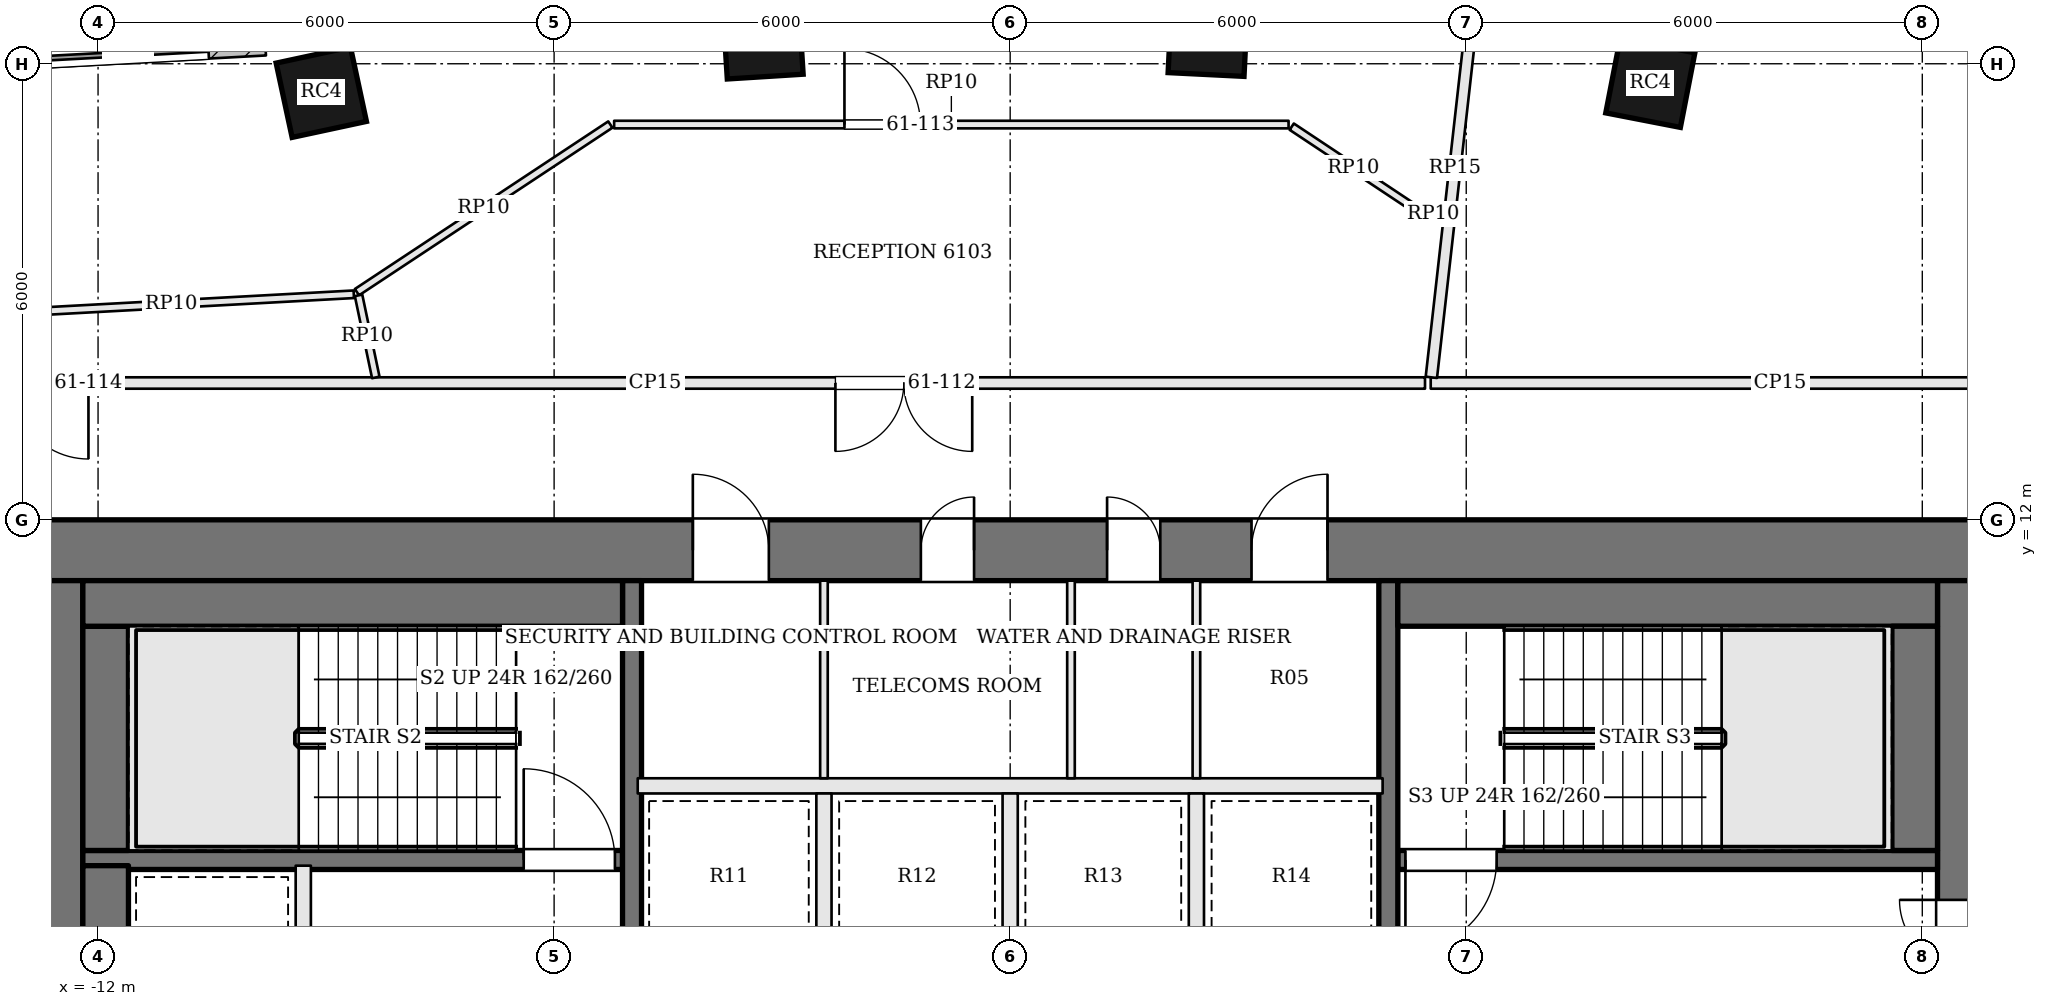
"""IFC4 building model, lengths in metres.
Left out: names, types, materials, properties, quantities, classifications, styles, units other than length and angle.
Written with IfcOpenShell. Run it as: python <this file> out.ifc"""

import sys

from ifc_helpers import new_model, si_unit, direction, frame, frame_2d, origin, origin_2d, place, context, subcontext, project, spatial, rectangle, extrude, element, fill, save


model = new_model("IFC4")
c1 = context("Model", 3, precision=1e-05, world=origin(), true_north=direction((0.0, 1.0)))
c2 = subcontext(c1, "Body", "Model", "MODEL_VIEW")
j1 = project(units=[si_unit("LENGTHUNIT", "METRE"), si_unit("PLANEANGLEUNIT", "RADIAN")], contexts=[c1])
p1 = place(None, origin())
s1 = spatial("IfcSite", under=j1, at=p1, CompositionType="ELEMENT")
p2 = place(p1, origin())
s2 = spatial("IfcBuilding", under=s1, at=p2, CompositionType="ELEMENT")
p3 = place(p2, frame((0.0, 0.0, 248.7)))
s3 = spatial("IfcBuildingStorey", under=s2, at=p3, CompositionType="ELEMENT", Elevation=248.7)
p4 = place(p3, frame((-13.0, 11.6, 0.0), z_axis=(0.0, 0.0, 1.0), x_axis=(1.0, 0.0, 0.0)))
e1 = element("IfcWall", 1, at=p4, inside=s3, PredefinedType="SHEAR", context=c2, shape_type="SweptSolid", body=[
    extrude(rectangle(XDim=26.0, YDim=0.8, at=frame_2d((13.0, 0.0))), origin(), (0.0, 0.0, 1.0), 3.9),
])
p5 = place(p4, frame((8.825, 0.0, 0.0)))
e2 = element("IfcOpeningElement", 2, at=p5, cuts=e1, PredefinedType="OPENING", context=c2, shape_type="SweptSolid", body=[
    extrude(rectangle(XDim=1.0, YDim=2.1, at=frame_2d((0.5, 1.05))), frame((0.0, 0.41, 0.0), z_axis=(0.0, -1.0, 0.0), x_axis=(1.0, 0.0, 0.0)), (0.0, 0.0, 1.0), 0.82),
])
p6 = place(p4, frame((11.825, 0.0, 0.0)))
e3 = element("IfcOpeningElement", 3, at=p6, cuts=e1, PredefinedType="OPENING", context=c2, shape_type="SweptSolid", body=[
    extrude(rectangle(XDim=0.7, YDim=2.1, at=frame_2d((0.35, 1.05))), frame((0.0, 0.41, 0.0), z_axis=(0.0, -1.0, 0.0), x_axis=(1.0, 0.0, 0.0)), (0.0, 0.0, 1.0), 0.82),
])
p7 = place(p4, frame((14.275, 0.0, 0.0)))
e4 = element("IfcOpeningElement", 4, at=p7, cuts=e1, PredefinedType="OPENING", context=c2, shape_type="SweptSolid", body=[
    extrude(rectangle(XDim=0.7, YDim=2.1, at=frame_2d((0.35, 1.05))), frame((0.0, 0.41, 0.0), z_axis=(0.0, -1.0, 0.0), x_axis=(1.0, 0.0, 0.0)), (0.0, 0.0, 1.0), 0.82),
])
p8 = place(p4, frame((16.175, 0.0, 0.0)))
e5 = element("IfcOpeningElement", 5, at=p8, cuts=e1, PredefinedType="OPENING", context=c2, shape_type="SweptSolid", body=[
    extrude(rectangle(XDim=1.0, YDim=2.1, at=frame_2d((0.5, 1.05))), frame((0.0, 0.41, 0.0), z_axis=(0.0, -1.0, 0.0), x_axis=(1.0, 0.0, 0.0)), (0.0, 0.0, 1.0), 0.82),
])
p9 = place(p3, frame((12.6, -2.2, 0.0), z_axis=(0.0, 0.0, 1.0), x_axis=(0.0, 1.0, 0.0)))
e6 = element("IfcWall", 6, at=p9, inside=s3, PredefinedType="SHEAR", context=c2, shape_type="SweptSolid", body=[
    extrude(rectangle(XDim=13.4, YDim=0.8, at=frame_2d((6.7, 0.0))), origin(), (0.0, 0.0, 1.0), 3.9),
])
p10 = place(p9, frame((7.4, 0.0, 0.0)))
e7 = element("IfcOpeningElement", 7, at=p10, cuts=e6, PredefinedType="OPENING", context=c2, shape_type="SweptSolid", body=[
    extrude(rectangle(XDim=1.8, YDim=2.1, at=frame_2d((0.9, 1.05))), frame((0.0, 0.41, 0.0), z_axis=(0.0, -1.0, 0.0), x_axis=(1.0, 0.0, 0.0)), (0.0, 0.0, 1.0), 0.82),
])
p11 = place(p3, frame((-12.6, -2.2, 0.0), z_axis=(0.0, 0.0, 1.0), x_axis=(0.0, 1.0, 0.0)))
e8 = element("IfcWall", 8, at=p11, inside=s3, PredefinedType="SHEAR", context=c2, shape_type="SweptSolid", body=[
    extrude(rectangle(XDim=13.4, YDim=0.8, at=frame_2d((6.7, 0.0))), origin(), (0.0, 0.0, 1.0), 3.9),
])
p12 = place(p11, frame((4.2, 0.0, 0.0)))
e9 = element("IfcOpeningElement", 9, at=p12, cuts=e8, PredefinedType="OPENING", context=c2, shape_type="SweptSolid", body=[
    extrude(rectangle(XDim=1.8, YDim=2.1, at=frame_2d((0.9, 1.05))), frame((0.0, 0.41, 0.0), z_axis=(0.0, -1.0, 0.0), x_axis=(1.0, 0.0, 0.0)), (0.0, 0.0, 1.0), 0.82),
])
for number, where, z_axis, x_axis in (
    (10, (8.422, 17.749, 0.0), (0.0, 0.0, 1.0), (-0.982, 0.191, 0.0)),
    (11, (2.602, 18.358, 0.0), (0.0, 0.0, 1.0), (-0.999, 0.05, 0.0)),
    (12, (-3.254, 18.33, 0.0), (0.0, 0.0, 1.0), (-0.998, -0.063, 0.0)),
    (13, (-9.063, 17.625, 0.0), (0.0, 0.0, 1.0), (-0.978, -0.21, 0.0)),
):
    element("IfcColumn", number, at=place(p3, frame(where, z_axis=z_axis, x_axis=x_axis)), inside=s3, PredefinedType="COLUMN", context=c2, shape_type="SweptSolid", body=[
        extrude(rectangle(XDim=1.0, YDim=1.0, at=origin_2d()), origin(), (0.0, 0.0, 1.0), 3.9),
    ])
p13 = place(p3, frame((-9.803, 18.334, 0.0), z_axis=(0.0, 0.0, 1.0), x_axis=(-0.998525941495, -0.054276552602, 0.0)))
e14 = element("IfcWall", 14, at=p13, inside=s3, PredefinedType="SOLIDWALL", context=c2, shape_type="SweptSolid", body=[
    extrude(rectangle(XDim=3.603, YDim=0.45, at=frame_2d((1.802, 0.0))), origin(), (0.0, 0.0, 1.0), 3.7),
])
p14 = place(p13, frame((0.751, 0.0, 0.9)))
e15 = element("IfcOpeningElement", 15, at=p14, cuts=e14, PredefinedType="OPENING", context=c2, shape_type="SweptSolid", body=[
    extrude(rectangle(XDim=2.1, YDim=2.3, at=frame_2d((1.05, 1.15))), frame((0.0, 0.235, 0.0), z_axis=(0.0, -1.0, 0.0), x_axis=(1.0, 0.0, 0.0)), (0.0, 0.0, 1.0), 0.47),
])
p15 = place(p3, frame((12.2, 7.525, 0.0), z_axis=(0.0, 0.0, 1.0), x_axis=(-1.0, 0.0, 0.0)))
e16 = element("IfcWall", 16, at=p15, inside=s3, PredefinedType="SOLIDWALL", context=c2, shape_type="SweptSolid", body=[
    extrude(rectangle(XDim=7.1, YDim=0.25, at=frame_2d((3.55, 0.0))), origin(), (0.0, 0.0, 1.0), 3.7),
])
p16 = place(p15, frame((5.8, 0.0, 0.0)))
e17 = element("IfcOpeningElement", 17, at=p16, cuts=e16, PredefinedType="OPENING", context=c2, shape_type="SweptSolid", body=[
    extrude(rectangle(XDim=1.2, YDim=2.1, at=frame_2d((0.6, 1.05))), frame((0.0, 0.135, 0.0), z_axis=(0.0, -1.0, 0.0), x_axis=(1.0, 0.0, 0.0)), (0.0, 0.0, 1.0), 0.27),
])
p17 = place(p3, frame((-12.2, 7.525, 0.0), z_axis=(0.0, 0.0, 1.0), x_axis=(1.0, 0.0, 0.0)))
e18 = element("IfcWall", 18, at=p17, inside=s3, PredefinedType="SOLIDWALL", context=c2, shape_type="SweptSolid", body=[
    extrude(rectangle(XDim=7.1, YDim=0.25, at=frame_2d((3.55, 0.0))), origin(), (0.0, 0.0, 1.0), 3.7),
])
p18 = place(p17, frame((5.8, 0.0, 0.0)))
e19 = element("IfcOpeningElement", 19, at=p18, cuts=e18, PredefinedType="OPENING", context=c2, shape_type="SweptSolid", body=[
    extrude(rectangle(XDim=1.2, YDim=2.1, at=frame_2d((0.6, 1.05))), frame((0.0, 0.135, 0.0), z_axis=(0.0, -1.0, 0.0), x_axis=(1.0, 0.0, 0.0)), (0.0, 0.0, 1.0), 0.27),
])
p19 = place(p3, frame((-9.3, 4.45, 0.0), z_axis=(0.0, 0.0, 1.0), x_axis=(0.0, 1.0, 0.0)))
e20 = element("IfcWall", 20, at=p19, inside=s3, PredefinedType="SOLIDWALL", context=c2, shape_type="SweptSolid", body=[
    extrude(rectangle(XDim=3.0, YDim=0.2, at=frame_2d((1.5, 0.0))), origin(), (0.0, 0.0, 1.0), 3.7),
])
p20 = place(p3, frame((-4.975, -2.2, 0.0), z_axis=(0.0, 0.0, 1.0), x_axis=(0.0, 1.0, 0.0)))
e21 = element("IfcWall", 21, at=p20, inside=s3, PredefinedType="SOLIDWALL", context=c2, shape_type="SweptSolid", body=[
    extrude(rectangle(XDim=13.4, YDim=0.25, at=frame_2d((6.7, 0.0))), origin(), (0.0, 0.0, 1.0), 3.7),
])
p21 = place(p20, frame((5.25, 0.0, 0.0)))
e22 = element("IfcOpeningElement", 22, at=p21, cuts=e21, PredefinedType="OPENING", context=c2, shape_type="SweptSolid", body=[
    extrude(rectangle(XDim=1.2, YDim=2.1, at=frame_2d((0.6, 1.05))), frame((0.0, 0.135, 0.0), z_axis=(0.0, -1.0, 0.0), x_axis=(1.0, 0.0, 0.0)), (0.0, 0.0, 1.0), 0.27),
])
p22 = place(p3, frame((4.975, 11.2, 0.0), z_axis=(0.0, 0.0, 1.0), x_axis=(0.0, -1.0, 0.0)))
e23 = element("IfcWall", 23, at=p22, inside=s3, PredefinedType="SOLIDWALL", context=c2, shape_type="SweptSolid", body=[
    extrude(rectangle(XDim=13.4, YDim=0.25, at=frame_2d((6.7, 0.0))), origin(), (0.0, 0.0, 1.0), 3.7),
])
p23 = place(p22, frame((5.25, 0.0, 0.0)))
e24 = element("IfcOpeningElement", 24, at=p23, cuts=e23, PredefinedType="OPENING", context=c2, shape_type="SweptSolid", body=[
    extrude(rectangle(XDim=1.2, YDim=2.1, at=frame_2d((0.6, 1.05))), frame((0.0, 0.135, 0.0), z_axis=(0.0, -1.0, 0.0), x_axis=(1.0, 0.0, 0.0)), (0.0, 0.0, 1.0), 0.27),
])
p24 = place(p3, frame((-11.9, 4.45, 0.0), z_axis=(0.0, 0.0, 1.0), x_axis=(0.0, 1.0, 0.0)))
e25 = element("IfcWall", 25, at=p24, inside=s3, PredefinedType="SOLIDWALL", context=c2, shape_type="SweptSolid", body=[
    extrude(rectangle(XDim=3.0, YDim=0.6, at=frame_2d((1.5, 0.0))), origin(), (0.0, 0.0, 1.0), 3.7),
])
p25 = place(p3, frame((-11.9, 7.65, 0.0), z_axis=(0.0, 0.0, 1.0), x_axis=(0.0, 1.0, 0.0)))
e26 = element("IfcWall", 26, at=p25, inside=s3, PredefinedType="SOLIDWALL", context=c2, shape_type="SweptSolid", body=[
    extrude(rectangle(XDim=2.95, YDim=0.6, at=frame_2d((1.475, 0.0))), origin(), (0.0, 0.0, 1.0), 3.7),
])
for number, where, z_axis, x_axis in (
    (27, (-12.2, 10.9, 0.0), (0.0, 0.0, 1.0), (1.0, 0.0, 0.0)),
    (28, (12.2, 10.9, 0.0), (0.0, 0.0, 1.0), (-1.0, 0.0, 0.0)),
):
    element("IfcWall", number, at=place(p3, frame(where, z_axis=z_axis, x_axis=x_axis)), inside=s3, PredefinedType="SOLIDWALL", context=c2, shape_type="SweptSolid", body=[
        extrude(rectangle(XDim=7.1, YDim=0.6, at=frame_2d((3.55, 0.0))), origin(), (0.0, 0.0, 1.0), 3.7),
    ])
p26 = place(p3, frame((11.9, 10.6, 0.0), z_axis=(0.0, 0.0, 1.0), x_axis=(0.0, -1.0, 0.0)))
e29 = element("IfcWall", 29, at=p26, inside=s3, PredefinedType="SOLIDWALL", context=c2, shape_type="SweptSolid", body=[
    extrude(rectangle(XDim=2.95, YDim=0.6, at=frame_2d((1.475, 0.0))), origin(), (0.0, 0.0, 1.0), 3.7),
])
p27 = place(p3, frame((-4.9, 8.5, 0.0), z_axis=(0.0, 0.0, 1.0), x_axis=(1.0, 0.0, 0.0)))
e30 = element("IfcWall", 30, at=p27, inside=s3, PredefinedType="SOLIDWALL", context=c2, shape_type="SweptSolid", body=[
    extrude(rectangle(XDim=9.8, YDim=0.2, at=frame_2d((4.9, 0.0))), origin(), (0.0, 0.0, 1.0), 3.7),
])
for number, where, z_axis, x_axis in (
    (31, (-2.45, 6.2, 0.0), (0.0, 0.0, 1.0), (0.0, 1.0, 0.0)),
    (32, (0.0, 6.2, 0.0), (0.0, 0.0, 1.0), (0.0, 1.0, 0.0)),
    (33, (2.45, 6.2, 0.0), (0.0, 0.0, 1.0), (0.0, 1.0, 0.0)),
):
    element("IfcWall", number, at=place(p3, frame(where, z_axis=z_axis, x_axis=x_axis)), inside=s3, PredefinedType="SOLIDWALL", context=c2, shape_type="SweptSolid", body=[
        extrude(rectangle(XDim=2.2, YDim=0.2, at=frame_2d((1.1, 0.0))), origin(), (0.0, 0.0, 1.0), 3.7),
    ])
for number, where, z_axis, x_axis in (
    (34, (-2.45, 8.6, 0.0), (0.0, 0.0, 1.0), (0.0, 1.0, 0.0)),
    (35, (0.8, 8.6, 0.0), (0.0, 0.0, 1.0), (0.0, 1.0, 0.0)),
    (36, (2.45, 8.6, 0.0), (0.0, 0.0, 1.0), (0.0, 1.0, 0.0)),
):
    element("IfcWall", number, at=place(p3, frame(where, z_axis=z_axis, x_axis=x_axis)), inside=s3, PredefinedType="PARTITIONING", context=c2, shape_type="SweptSolid", body=[
        extrude(rectangle(XDim=2.6, YDim=0.1, at=frame_2d((1.3, 0.0))), origin(), (0.0, 0.0, 1.0), 3.7),
    ])
p28 = place(p3, frame((14.725, 13.8, 0.0), z_axis=(0.0, 0.0, 1.0), x_axis=(-1.0, 0.0, 0.0)))
e37 = element("IfcWall", 37, at=p28, inside=s3, PredefinedType="PARTITIONING", context=c2, shape_type="SweptSolid", body=[
    extrude(rectangle(XDim=9.192, YDim=0.15, at=frame_2d((4.596, 0.0))), origin(), (0.0, 0.0, 1.0), 3.084),
])
p29 = place(p3, frame((6.161, 19.377, 0.0), z_axis=(0.0, 0.0, 1.0), x_axis=(-0.11193626313, -0.993715388326, 0.0)))
e38 = element("IfcWall", 38, at=p29, inside=s3, PredefinedType="PARTITIONING", context=c2, shape_type="SweptSolid", body=[
    extrude(rectangle(XDim=5.538, YDim=0.15, at=frame_2d((2.769, 0.0))), origin(), (0.0, 0.0, 1.0), 3.084),
])
p30 = place(p3, frame((5.458, 13.8, 0.0), z_axis=(0.0, 0.0, 1.0), x_axis=(-1.0, 0.0, 0.0)))
e39 = element("IfcWall", 39, at=p30, inside=s3, PredefinedType="PARTITIONING", context=c2, shape_type="SweptSolid", body=[
    extrude(rectangle(XDim=20.258, YDim=0.15, at=frame_2d((10.129, 0.0))), origin(), (0.0, 0.0, 1.0), 3.084),
])
p31 = place(p30, frame((5.957, 0.0, 0.0)))
e40 = element("IfcOpeningElement", 40, at=p31, cuts=e39, PredefinedType="OPENING", context=c2, shape_type="SweptSolid", body=[
    extrude(rectangle(XDim=1.8, YDim=2.1, at=frame_2d((0.9, 1.05))), frame((0.0, 0.085, 0.0), z_axis=(0.0, -1.0, 0.0), x_axis=(1.0, 0.0, 0.0)), (0.0, 0.0, 1.0), 0.17),
])
p32 = place(p30, frame((17.584, 0.0, 0.0)))
e41 = element("IfcOpeningElement", 41, at=p32, cuts=e39, PredefinedType="OPENING", context=c2, shape_type="SweptSolid", body=[
    extrude(rectangle(XDim=1.0, YDim=2.4, at=frame_2d((0.5, 1.2))), frame((0.0, 0.085, 0.0), z_axis=(0.0, -1.0, 0.0), x_axis=(1.0, 0.0, 0.0)), (0.0, 0.0, 1.0), 0.17),
])
p33 = place(p3, frame((-13.437, 14.706, 0.0), z_axis=(0.0, 0.0, 1.0), x_axis=(0.998525882111, 0.054277645072, 0.0)))
e42 = element("IfcWall", 42, at=p33, inside=s3, PredefinedType="PARTITIONING", context=c2, shape_type="SweptSolid", body=[
    extrude(rectangle(XDim=4.808, YDim=0.1, at=frame_2d((2.404, 0.0))), origin(), (0.0, 0.0, 1.0), 3.084),
])
p34 = place(p3, frame((-8.594, 14.995, 0.0), z_axis=(0.0, 0.0, 1.0), x_axis=(0.834065304192, 0.551665721559, 0.0)))
e43 = element("IfcWall", 43, at=p34, inside=s3, PredefinedType="PARTITIONING", context=c2, shape_type="SweptSolid", body=[
    extrude(rectangle(XDim=3.997, YDim=0.1, at=frame_2d((1.998, 0.0))), origin(), (0.0, 0.0, 1.0), 3.084),
])
p35 = place(p3, frame((-5.21, 17.2, 0.0), z_axis=(0.0, 0.0, 1.0), x_axis=(1.0, 0.0, 0.0)))
e44 = element("IfcWall", 44, at=p35, inside=s3, PredefinedType="PARTITIONING", context=c2, shape_type="SweptSolid", body=[
    extrude(rectangle(XDim=8.873, YDim=0.1, at=frame_2d((4.437, 0.0))), origin(), (0.0, 0.0, 1.0), 3.084),
])
p36 = place(p35, frame((3.03, 0.0, 0.0)))
e45 = element("IfcOpeningElement", 45, at=p36, cuts=e44, PredefinedType="OPENING", context=c2, shape_type="SweptSolid", body=[
    extrude(rectangle(XDim=1.0, YDim=2.1, at=frame_2d((0.5, 1.05))), frame((0.0, 0.06, 0.0), z_axis=(0.0, -1.0, 0.0), x_axis=(1.0, 0.0, 0.0)), (0.0, 0.0, 1.0), 0.12),
])
p37 = place(p3, frame((3.704, 17.172, 0.0), z_axis=(0.0, 0.0, 1.0), x_axis=(0.832954205631, -0.553341929842, 0.0)))
e46 = element("IfcWall", 46, at=p37, inside=s3, PredefinedType="PARTITIONING", context=c2, shape_type="SweptSolid", body=[
    extrude(rectangle(XDim=1.951, YDim=0.1, at=frame_2d((0.975, 0.0))), origin(), (0.0, 0.0, 1.0), 3.084),
])
p38 = place(p3, frame((5.377, 16.079, 0.0), z_axis=(0.0, 0.0, 1.0), x_axis=(0.958536356279, -0.284970268083, 0.0)))
e47 = element("IfcWall", 47, at=p38, inside=s3, PredefinedType="PARTITIONING", context=c2, shape_type="SweptSolid", body=[
    extrude(rectangle(XDim=0.396, YDim=0.1, at=frame_2d((0.198, 0.0))), origin(), (0.0, 0.0, 1.0), 3.084),
])
p39 = place(p3, frame((-8.346, 13.873, 0.0), z_axis=(0.0, 0.0, 1.0), x_axis=(-0.205341331552, 0.978690419671, 0.0)))
e48 = element("IfcWall", 48, at=p39, inside=s3, PredefinedType="PARTITIONING", context=c2, shape_type="SweptSolid", body=[
    extrude(rectangle(XDim=1.103, YDim=0.1, at=frame_2d((0.552, 0.0))), origin(), (0.0, 0.0, 1.0), 3.084),
])
p40 = place(p14, origin())
e49 = element("IfcWindow", 49, at=p40, inside=s3, PartitioningType="SINGLE_PANEL", PredefinedType="WINDOW", context=c2, shape_type="SweptSolid", body=[
    extrude(rectangle(XDim=2.1, YDim=2.3, at=frame_2d((1.05, 1.15))), frame((0.0, 0.135, 0.0), z_axis=(0.0, -1.0, 0.0), x_axis=(1.0, 0.0, 0.0)), (0.0, 0.0, 1.0), 0.06),
])
fill(e15, e49)
p41 = place(p10, origin())
e50 = element("IfcDoor", 50, at=p41, inside=s3, OperationType="DOUBLE_DOOR_SINGLE_SWING", PredefinedType="DOOR", context=c2, shape_type="SweptSolid", body=[
    extrude(rectangle(XDim=1.8, YDim=2.1, at=frame_2d((0.9, 1.05))), frame((0.0, 0.025, 0.0), z_axis=(0.0, -1.0, 0.0), x_axis=(1.0, 0.0, 0.0)), (0.0, 0.0, 1.0), 0.05),
])
fill(e7, e50)
p42 = place(p16, origin())
e51 = element("IfcDoor", 51, at=p42, inside=s3, OperationType="SINGLE_SWING_RIGHT", PredefinedType="DOOR", context=c2, shape_type="SweptSolid", body=[
    extrude(rectangle(XDim=1.2, YDim=2.1, at=frame_2d((0.6, 1.05))), frame((0.0, 0.025, 0.0), z_axis=(0.0, -1.0, 0.0), x_axis=(1.0, 0.0, 0.0)), (0.0, 0.0, 1.0), 0.05),
])
fill(e17, e51)
p43 = place(p18, origin())
e52 = element("IfcDoor", 52, at=p43, inside=s3, OperationType="SINGLE_SWING_LEFT", PredefinedType="DOOR", context=c2, shape_type="SweptSolid", body=[
    extrude(rectangle(XDim=1.2, YDim=2.1, at=frame_2d((0.6, 1.05))), frame((0.0, 0.025, 0.0), z_axis=(0.0, -1.0, 0.0), x_axis=(1.0, 0.0, 0.0)), (0.0, 0.0, 1.0), 0.05),
])
fill(e19, e52)
p44 = place(p5, origin())
e53 = element("IfcDoor", 53, at=p44, inside=s3, OperationType="SINGLE_SWING_LEFT", PredefinedType="DOOR", context=c2, shape_type="SweptSolid", body=[
    extrude(rectangle(XDim=1.0, YDim=2.1, at=frame_2d((0.5, 1.05))), frame((0.0, 0.025, 0.0), z_axis=(0.0, -1.0, 0.0), x_axis=(1.0, 0.0, 0.0)), (0.0, 0.0, 1.0), 0.05),
])
fill(e2, e53)
p45 = place(p6, origin())
e54 = element("IfcDoor", 54, at=p45, inside=s3, OperationType="SINGLE_SWING_RIGHT", PredefinedType="DOOR", context=c2, shape_type="SweptSolid", body=[
    extrude(rectangle(XDim=0.7, YDim=2.1, at=frame_2d((0.35, 1.05))), frame((0.0, 0.025, 0.0), z_axis=(0.0, -1.0, 0.0), x_axis=(1.0, 0.0, 0.0)), (0.0, 0.0, 1.0), 0.05),
])
fill(e3, e54)
p46 = place(p7, origin())
e55 = element("IfcDoor", 55, at=p46, inside=s3, OperationType="SINGLE_SWING_LEFT", PredefinedType="DOOR", context=c2, shape_type="SweptSolid", body=[
    extrude(rectangle(XDim=0.7, YDim=2.1, at=frame_2d((0.35, 1.05))), frame((0.0, 0.025, 0.0), z_axis=(0.0, -1.0, 0.0), x_axis=(1.0, 0.0, 0.0)), (0.0, 0.0, 1.0), 0.05),
])
fill(e4, e55)
p47 = place(p8, origin())
e56 = element("IfcDoor", 56, at=p47, inside=s3, OperationType="SINGLE_SWING_RIGHT", PredefinedType="DOOR", context=c2, shape_type="SweptSolid", body=[
    extrude(rectangle(XDim=1.0, YDim=2.1, at=frame_2d((0.5, 1.05))), frame((0.0, 0.025, 0.0), z_axis=(0.0, -1.0, 0.0), x_axis=(1.0, 0.0, 0.0)), (0.0, 0.0, 1.0), 0.05),
])
fill(e5, e56)
p48 = place(p31, origin())
e57 = element("IfcDoor", 57, at=p48, inside=s3, OperationType="DOUBLE_DOOR_SINGLE_SWING", PredefinedType="DOOR", context=c2, shape_type="SweptSolid", body=[
    extrude(rectangle(XDim=1.8, YDim=2.1, at=frame_2d((0.9, 1.05))), frame((0.0, 0.025, 0.0), z_axis=(0.0, -1.0, 0.0), x_axis=(1.0, 0.0, 0.0)), (0.0, 0.0, 1.0), 0.05),
])
fill(e40, e57)
p49 = place(p36, origin())
e58 = element("IfcDoor", 58, at=p49, inside=s3, OperationType="SINGLE_SWING_LEFT", PredefinedType="DOOR", context=c2, shape_type="SweptSolid", body=[
    extrude(rectangle(XDim=1.0, YDim=2.1, at=frame_2d((0.5, 1.05))), frame((0.0, 0.025, 0.0), z_axis=(0.0, -1.0, 0.0), x_axis=(1.0, 0.0, 0.0)), (0.0, 0.0, 1.0), 0.05),
])
fill(e45, e58)
p50 = place(p32, origin())
e59 = element("IfcDoor", 59, at=p50, inside=s3, OperationType="SINGLE_SWING_LEFT", PredefinedType="DOOR", context=c2, shape_type="SweptSolid", body=[
    extrude(rectangle(XDim=1.0, YDim=2.4, at=frame_2d((0.5, 1.2))), frame((0.0, 0.025, 0.0), z_axis=(0.0, -1.0, 0.0), x_axis=(1.0, 0.0, 0.0)), (0.0, 0.0, 1.0), 0.05),
])
fill(e41, e59)
save(model, sys.argv[1])
